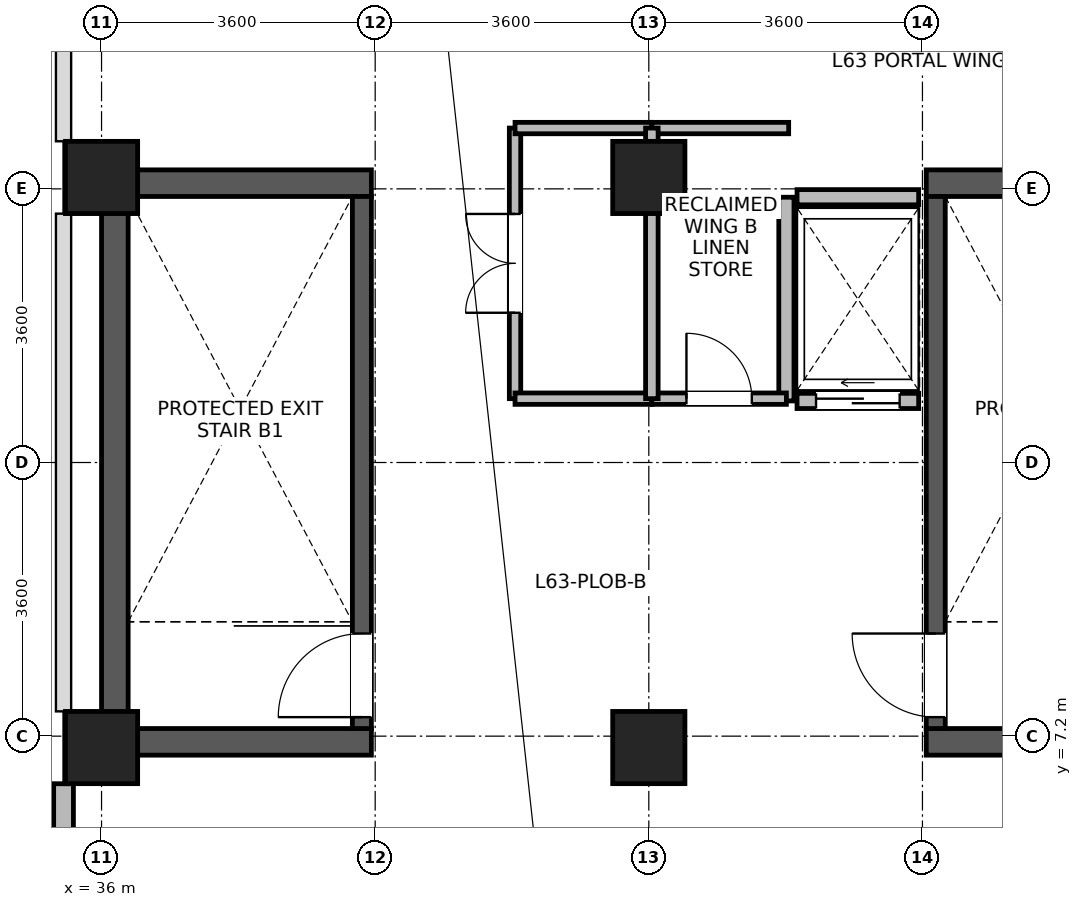
"""IFC4 building model, lengths in metres.
Left out: names, types, materials, properties, quantities, classifications, styles, units other than length and angle.
Written with IfcOpenShell. Run it as: python <this file> out.ifc"""

import sys

from ifc_helpers import new_model, si_unit, direction, frame, frame_2d, origin, origin_2d, place, context, subcontext, project, spatial, rectangle, extrude, source, transform, mapped, element, fill, save


model = new_model("IFC4")
c1 = context("Model", 3, precision=1e-05, world=origin(), true_north=direction((0.0, 1.0)))
c2 = subcontext(c1, "Body", "Model", "MODEL_VIEW")
j1 = project(units=[si_unit("LENGTHUNIT", "METRE"), si_unit("PLANEANGLEUNIT", "RADIAN")], contexts=[c1])
p1 = place(None, origin())
s1 = spatial("IfcSite", under=j1, at=p1, CompositionType="ELEMENT")
p2 = place(p1, origin())
s2 = spatial("IfcBuilding", under=s1, at=p2, CompositionType="ELEMENT")
p3 = place(p2, frame((0.0, 0.0, 246.2)))
s3 = spatial("IfcBuildingStorey", under=s2, at=p3, CompositionType="ELEMENT", Elevation=246.2)
p4 = place(p3, frame((36.175, 6.95, 0.0), z_axis=(0.0, 0.0, 1.0), x_axis=(0.0, 1.0, 0.0)))
e1 = element("IfcWall", 1, at=p4, inside=s3, PredefinedType="SHEAR", context=c2, shape_type="SweptSolid", body=[
    extrude(rectangle(XDim=7.7, YDim=0.35, at=frame_2d((3.85, 0.0))), origin(), (0.0, 0.0, 1.0), 3.28),
])
for number, where, z_axis, x_axis in (
    (2, (36.35, 7.125, 0.0), (0.0, 0.0, 1.0), (1.0, 0.0, 0.0)),
    (3, (46.85, 7.125, 0.0), (0.0, 0.0, 1.0), (1.0, 0.0, 0.0)),
    (4, (36.35, 14.475, 0.0), (0.0, 0.0, 1.0), (1.0, 0.0, 0.0)),
    (5, (46.85, 14.475, 0.0), (0.0, 0.0, 1.0), (1.0, 0.0, 0.0)),
):
    element("IfcWall", number, at=place(p3, frame(where, z_axis=z_axis, x_axis=x_axis)), inside=s3, PredefinedType="SHEAR", context=c2, shape_type="SweptSolid", body=[
        extrude(rectangle(XDim=3.2, YDim=0.35, at=frame_2d((1.6, 0.0))), origin(), (0.0, 0.0, 1.0), 3.28),
    ])
p5 = place(p3, frame((39.425, 7.3, 0.0), z_axis=(0.0, 0.0, 1.0), x_axis=(0.0, 1.0, 0.0)))
e6 = element("IfcWall", 6, at=p5, inside=s3, PredefinedType="SHEAR", context=c2, shape_type="SweptSolid", body=[
    extrude(rectangle(XDim=7.0, YDim=0.25, at=frame_2d((3.5, 0.0))), origin(), (0.0, 0.0, 1.0), 3.28),
])
p6 = place(p5, frame((0.15, 0.0, 0.0)))
e7 = element("IfcOpeningElement", 7, at=p6, cuts=e6, PredefinedType="OPENING", context=c2, shape_type="SweptSolid", body=[
    extrude(rectangle(XDim=1.1, YDim=2.08, at=frame_2d((0.55, 1.04))), frame((0.0, 0.135, 0.0), z_axis=(0.0, -1.0, 0.0), x_axis=(1.0, 0.0, 0.0)), (0.0, 0.0, 1.0), 0.27),
])
p7 = place(p3, frame((46.975, 7.3, 0.0), z_axis=(0.0, 0.0, 1.0), x_axis=(0.0, 1.0, 0.0)))
e8 = element("IfcWall", 8, at=p7, inside=s3, PredefinedType="SHEAR", context=c2, shape_type="SweptSolid", body=[
    extrude(rectangle(XDim=7.0, YDim=0.25, at=frame_2d((3.5, 0.0))), origin(), (0.0, 0.0, 1.0), 3.28),
])
p8 = place(p7, frame((0.15, 0.0, 0.0)))
e9 = element("IfcOpeningElement", 9, at=p8, cuts=e8, PredefinedType="OPENING", context=c2, shape_type="SweptSolid", body=[
    extrude(rectangle(XDim=1.1, YDim=2.08, at=frame_2d((0.55, 1.04))), frame((0.0, 0.135, 0.0), z_axis=(0.0, -1.0, 0.0), x_axis=(1.0, 0.0, 0.0)), (0.0, 0.0, 1.0), 0.27),
])
m1 = source(origin(), c2, "Body", "SweptSolid", [
    extrude(rectangle(XDim=0.95, YDim=0.95, at=origin_2d()), origin(), (0.0, 0.0, 1.0), 3.7),
])
for number, where, z_axis, x_axis in (
    (10, (36.0, 7.05, 0.0), (0.0, 0.0, 1.0), (1.0, 0.0, 0.0)),
    (11, (36.0, 14.55, 0.0), (0.0, 0.0, 1.0), (1.0, 0.0, 0.0)),
    (12, (43.2, 7.05, 0.0), (0.0, 0.0, 1.0), (1.0, 0.0, 0.0)),
    (13, (43.2, 14.55, 0.0), (0.0, 0.0, 1.0), (1.0, 0.0, 0.0)),
):
    element("IfcColumn", number, at=place(p3, frame(where, z_axis=z_axis, x_axis=x_axis)), inside=s3, PredefinedType="COLUMN", context=c2, shape_type="MappedRepresentation", body=[
        mapped(m1, transform((0.0, 0.0, 0.0), x_axis=(1.0, 0.0, 0.0), y_axis=(0.0, 1.0, 0.0), z_axis=(0.0, 0.0, 1.0), scale=1.0)),
    ])
p9 = place(p3, frame((35.5, 5.8, 0.0), z_axis=(0.0, 0.0, 1.0), x_axis=(0.0, 1.0, 0.0)))
e14 = element("IfcWall", 14, at=p9, inside=s3, PredefinedType="STANDARD", context=c2, shape_type="SweptSolid", body=[
    extrude(rectangle(XDim=0.774, YDim=0.26, at=frame_2d((0.387, 0.0))), origin(), (0.0, 0.0, 1.0), 3.28),
])
p10 = place(p3, frame((45.15, 11.61, 0.0), z_axis=(0.0, 0.0, 1.0), x_axis=(1.0, 0.0, 0.0)))
e15 = element("IfcWall", 15, at=p10, inside=s3, PredefinedType="PARTITIONING", context=c2, shape_type="SweptSolid", body=[
    extrude(rectangle(XDim=1.6, YDim=0.2, at=frame_2d((0.8, 0.0))), origin(), (0.0, 0.0, 1.0), 3.26),
])
p11 = place(p10, frame((0.25, 0.0, 0.0)))
e16 = element("IfcOpeningElement", 16, at=p11, cuts=e15, PredefinedType="OPENING", context=c2, shape_type="SweptSolid", body=[
    extrude(rectangle(XDim=1.1, YDim=2.12, at=frame_2d((0.55, 1.06))), frame((0.0, 0.11, 0.0), z_axis=(0.0, -1.0, 0.0), x_axis=(1.0, 0.0, 0.0)), (0.0, 0.0, 1.0), 0.22),
])
p12 = place(p3, frame((45.15, 14.29, 0.0), z_axis=(0.0, 0.0, 1.0), x_axis=(1.0, 0.0, 0.0)))
e17 = element("IfcWall", 17, at=p12, inside=s3, PredefinedType="PARTITIONING", context=c2, shape_type="SweptSolid", body=[
    extrude(rectangle(XDim=1.6, YDim=0.2, at=frame_2d((0.8, 0.0))), origin(), (0.0, 0.0, 1.0), 2.36),
])
p13 = place(p3, frame((45.01, 11.61, 0.0), z_axis=(0.0, 0.0, 1.0), x_axis=(0.0, 1.0, 0.0)))
e18 = element("IfcWall", 18, at=p13, inside=s3, PredefinedType="PARTITIONING", context=c2, shape_type="SweptSolid", body=[
    extrude(rectangle(XDim=2.68, YDim=0.2, at=frame_2d((1.34, 0.0))), origin(), (0.0, 0.0, 1.0), 3.26),
])
p14 = place(p3, frame((41.44, 11.64, 0.0), z_axis=(0.0, 0.0, 1.0), x_axis=(0.0, 1.0, 0.0)))
e19 = element("IfcWall", 19, at=p14, inside=s3, PredefinedType="PARTITIONING", context=c2, shape_type="SweptSolid", body=[
    extrude(rectangle(XDim=3.56, YDim=0.15, at=frame_2d((1.78, 0.0))), origin(), (0.0, 0.0, 1.0), 3.26),
])
p15 = place(p14, frame((1.13, 0.0, 0.0)))
e20 = element("IfcOpeningElement", 20, at=p15, cuts=e19, PredefinedType="OPENING", context=c2, shape_type="SweptSolid", body=[
    extrude(rectangle(XDim=1.3, YDim=2.12, at=frame_2d((0.65, 1.06))), frame((0.0, 0.085, 0.0), z_axis=(0.0, -1.0, 0.0), x_axis=(1.0, 0.0, 0.0)), (0.0, 0.0, 1.0), 0.17),
])
for number, where, z_axis, x_axis in (
    (21, (41.44, 11.64, 0.0), (0.0, 0.0, 1.0), (1.0, 0.0, 0.0)),
    (22, (41.44, 15.2, 0.0), (0.0, 0.0, 1.0), (1.0, 0.0, 0.0)),
):
    element("IfcWall", number, at=place(p3, frame(where, z_axis=z_axis, x_axis=x_axis)), inside=s3, PredefinedType="PARTITIONING", context=c2, shape_type="SweptSolid", body=[
        extrude(rectangle(XDim=1.8, YDim=0.15, at=frame_2d((0.9, 0.0))), origin(), (0.0, 0.0, 1.0), 3.26),
    ])
p16 = place(p3, frame((43.24, 11.64, 0.0), z_axis=(0.0, 0.0, 1.0), x_axis=(1.0, 0.0, 0.0)))
e23 = element("IfcWall", 23, at=p16, inside=s3, PredefinedType="PARTITIONING", context=c2, shape_type="SweptSolid", body=[
    extrude(rectangle(XDim=1.77, YDim=0.15, at=frame_2d((0.885, 0.0))), origin(), (0.0, 0.0, 1.0), 3.26),
])
p17 = place(p16, frame((0.455, 0.0, 0.0)))
e24 = element("IfcOpeningElement", 24, at=p17, cuts=e23, PredefinedType="OPENING", context=c2, shape_type="SweptSolid", body=[
    extrude(rectangle(XDim=0.86, YDim=2.02, at=frame_2d((0.43, 1.01))), frame((0.0, 0.085, 0.0), z_axis=(0.0, -1.0, 0.0), x_axis=(1.0, 0.0, 0.0)), (0.0, 0.0, 1.0), 0.17),
])
p18 = place(p3, frame((43.24, 15.2, 0.0), z_axis=(0.0, 0.0, 1.0), x_axis=(1.0, 0.0, 0.0)))
e25 = element("IfcWall", 25, at=p18, inside=s3, PredefinedType="PARTITIONING", context=c2, shape_type="SweptSolid", body=[
    extrude(rectangle(XDim=1.8, YDim=0.15, at=frame_2d((0.9, 0.0))), origin(), (0.0, 0.0, 1.0), 3.26),
])
p19 = place(p3, frame((43.24, 11.64, 0.0), z_axis=(0.0, 0.0, 1.0), x_axis=(0.0, 1.0, 0.0)))
e26 = element("IfcWall", 26, at=p19, inside=s3, PredefinedType="PARTITIONING", context=c2, shape_type="SweptSolid", body=[
    extrude(rectangle(XDim=3.56, YDim=0.165, at=frame_2d((1.78, 0.0))), origin(), (0.0, 0.0, 1.0), 3.26),
])
p20 = place(p6, origin())
e27 = element("IfcDoor", 27, at=p20, inside=s3, OperationType="SINGLE_SWING_LEFT", PredefinedType="DOOR", context=c2, shape_type="SweptSolid", body=[
    extrude(rectangle(XDim=1.1, YDim=2.08, at=frame_2d((0.55, 1.04))), frame((0.0, 0.025, 0.0), z_axis=(0.0, -1.0, 0.0), x_axis=(1.0, 0.0, 0.0)), (0.0, 0.0, 1.0), 0.05),
])
fill(e7, e27)
p21 = place(p8, origin())
e28 = element("IfcDoor", 28, at=p21, inside=s3, OperationType="SINGLE_SWING_RIGHT", PredefinedType="DOOR", context=c2, shape_type="SweptSolid", body=[
    extrude(rectangle(XDim=1.1, YDim=2.08, at=frame_2d((0.55, 1.04))), frame((0.0, 0.025, 0.0), z_axis=(0.0, -1.0, 0.0), x_axis=(1.0, 0.0, 0.0)), (0.0, 0.0, 1.0), 0.05),
])
fill(e9, e28)
p22 = place(p11, origin())
e29 = element("IfcDoor", 29, at=p22, inside=s3, OperationType="SLIDING_TO_LEFT", PredefinedType="DOOR", context=c2, shape_type="SweptSolid", body=[
    extrude(rectangle(XDim=1.1, YDim=2.12, at=frame_2d((0.55, 1.06))), frame((0.0, 0.025, 0.0), z_axis=(0.0, -1.0, 0.0), x_axis=(1.0, 0.0, 0.0)), (0.0, 0.0, 1.0), 0.05),
])
fill(e16, e29)
p23 = place(p15, origin())
e30 = element("IfcDoor", 30, at=p23, inside=s3, OperationType="DOUBLE_DOOR_SINGLE_SWING", PredefinedType="DOOR", context=c2, shape_type="SweptSolid", body=[
    extrude(rectangle(XDim=1.3, YDim=2.12, at=frame_2d((0.65, 1.06))), frame((0.0, 0.025, 0.0), z_axis=(0.0, -1.0, 0.0), x_axis=(1.0, 0.0, 0.0)), (0.0, 0.0, 1.0), 0.05),
])
fill(e20, e30)
p24 = place(p17, origin())
e31 = element("IfcDoor", 31, at=p24, inside=s3, OperationType="SINGLE_SWING_LEFT", PredefinedType="DOOR", context=c2, shape_type="SweptSolid", body=[
    extrude(rectangle(XDim=0.86, YDim=2.02, at=frame_2d((0.43, 1.01))), frame((0.0, 0.025, 0.0), z_axis=(0.0, -1.0, 0.0), x_axis=(1.0, 0.0, 0.0)), (0.0, 0.0, 1.0), 0.05),
])
fill(e24, e31)
save(model, sys.argv[1])
